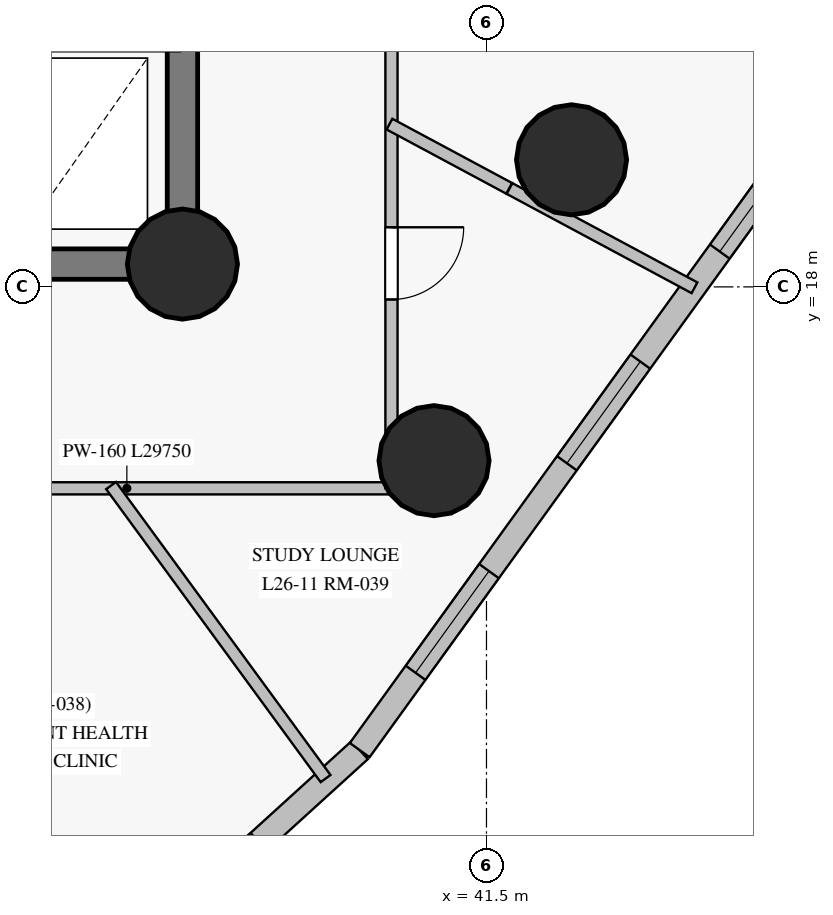
"""IFC4 building model, lengths in metres.
Left out: names, types, materials, properties, quantities, classifications, styles, units other than length and angle.
Written with IfcOpenShell. Run it as: python <this file> out.ifc"""

import sys

from ifc_helpers import new_model, si_unit, direction, frame, frame_2d, origin, origin_with_axes, origin_2d, place, context, subcontext, project, spatial, rectangle, circle, extrude, source, transform, mapped, element, fill, save


model = new_model("IFC4")
c1 = context("Model", 3, precision=1e-05, world=origin(), true_north=direction((0.0, 1.0)))
c2 = subcontext(c1, "Body", "Model", "MODEL_VIEW")
j1 = project(units=[si_unit("LENGTHUNIT", "METRE"), si_unit("PLANEANGLEUNIT", "RADIAN")], contexts=[c1])
p1 = place(None, origin())
s1 = spatial("IfcSite", under=j1, at=p1, CompositionType="ELEMENT")
p2 = place(p1, origin())
s2 = spatial("IfcBuilding", under=s1, at=p2, CompositionType="ELEMENT")
p3 = place(p2, frame((0.0, 0.0, 99.25)))
s3 = spatial("IfcBuildingStorey", under=s2, at=p3, CompositionType="ELEMENT", Elevation=99.25)
p4 = place(p3, frame((26.55, 18.3, 0.0), z_axis=(0.0, 0.0, 1.0), x_axis=(1.0, 0.0, 0.0)))
e1 = element("IfcWall", 1, at=p4, inside=s3, PredefinedType="SHEAR", context=c2, shape_type="SweptSolid", body=[
    extrude(rectangle(XDim=10.95, YDim=0.4, at=frame_2d((5.475, 0.0))), origin(), (0.0, 0.0, 1.0), 2.825),
])
p5 = place(p4, frame((4.55, 0.0, 0.0)))
e2 = element("IfcOpeningElement", 2, at=p5, cuts=e1, PredefinedType="OPENING", context=c2, shape_type="SweptSolid", body=[
    extrude(rectangle(XDim=1.4, YDim=2.2, at=frame_2d((0.7, 1.1))), frame((0.0, 0.21, 0.0), z_axis=(0.0, -1.0, 0.0), x_axis=(1.0, 0.0, 0.0)), (0.0, 0.0, 1.0), 0.42),
])
p6 = place(p3, frame((37.5, 18.3, 0.0), z_axis=(0.0, 0.0, 1.0), x_axis=(0.0, 1.0, 0.0)))
e3 = element("IfcWall", 3, at=p6, inside=s3, PredefinedType="SHEAR", context=c2, shape_type="SweptSolid", body=[
    extrude(rectangle(XDim=16.4, YDim=0.4, at=frame_2d((8.2, 0.0))), origin(), (0.0, 0.0, 1.0), 2.825),
])
p7 = place(p6, frame((14.15, 0.0, 0.0)))
e4 = element("IfcOpeningElement", 4, at=p7, cuts=e3, PredefinedType="OPENING", context=c2, shape_type="SweptSolid", body=[
    extrude(rectangle(XDim=1.2, YDim=2.15, at=frame_2d((0.6, 1.075))), frame((0.0, 0.21, 0.0), z_axis=(0.0, -1.0, 0.0), x_axis=(1.0, 0.0, 0.0)), (0.0, 0.0, 1.0), 0.42),
])
m1 = source(origin_with_axes(), c2, "Body", "SweptSolid", [
    extrude(circle(Radius=0.725, at=origin_2d()), origin(), (0.0, 0.0, 1.0), 3.05),
])
for number, where, z_axis, x_axis in (
    (5, (37.5, 18.3, 0.0), (0.0, 0.0, 1.0), (1.0, 0.0, 0.0)),
    (6, (42.619, 19.672, 0.0), (0.0, 0.0, 1.0), (1.0, 0.0, 0.0)),
    (7, (40.81, 15.714, 0.0), (0.0, 0.0, 1.0), (1.0, 0.0, 0.0)),
):
    element("IfcColumn", number, at=place(p3, frame(where, z_axis=z_axis, x_axis=x_axis)), inside=s3, PredefinedType="COLUMN", context=c2, shape_type="MappedRepresentation", body=[
        mapped(m1, transform((0.0, 0.0, 0.0), scale=1.0)),
    ])
p8 = place(p3, frame((28.773, 1.85, 0.0), z_axis=(0.0, 0.0, 1.0), x_axis=(0.739889815612, 0.672728073409, 0.0)))
e8 = element("IfcWall", 8, at=p8, inside=s3, PredefinedType="SOLIDWALL", context=c2, shape_type="SweptSolid", body=[
    extrude(rectangle(XDim=14.948, YDim=0.32, at=frame_2d((7.474, 0.0))), origin(), (0.0, 0.0, 1.0), 2.825),
])
p9 = place(p8, frame((2.629, 0.0, 0.85)))
e9 = element("IfcOpeningElement", 9, at=p9, cuts=e8, PredefinedType="OPENING", context=c2, shape_type="SweptSolid", body=[
    extrude(rectangle(XDim=1.65, YDim=1.65, at=frame_2d((0.825, 0.825))), frame((0.0, 0.17, 0.0), z_axis=(0.0, -1.0, 0.0), x_axis=(1.0, 0.0, 0.0)), (0.0, 0.0, 1.0), 0.34),
])
p10 = place(p8, frame((8.063, 0.0, 0.85)))
e10 = element("IfcOpeningElement", 10, at=p10, cuts=e8, PredefinedType="OPENING", context=c2, shape_type="SweptSolid", body=[
    extrude(rectangle(XDim=1.65, YDim=1.65, at=frame_2d((0.825, 0.825))), frame((0.0, 0.17, 0.0), z_axis=(0.0, -1.0, 0.0), x_axis=(1.0, 0.0, 0.0)), (0.0, 0.0, 1.0), 0.34),
])
p11 = place(p8, frame((11.502, 0.0, 0.85)))
e11 = element("IfcOpeningElement", 11, at=p11, cuts=e8, PredefinedType="OPENING", context=c2, shape_type="SweptSolid", body=[
    extrude(rectangle(XDim=1.65, YDim=1.65, at=frame_2d((0.825, 0.825))), frame((0.0, 0.17, 0.0), z_axis=(0.0, -1.0, 0.0), x_axis=(1.0, 0.0, 0.0)), (0.0, 0.0, 1.0), 0.34),
])
p12 = place(p3, frame((39.832, 11.906, 0.0), z_axis=(0.0, 0.0, 1.0), x_axis=(0.585524008993, 0.810655065298, 0.0)))
e12 = element("IfcWall", 12, at=p12, inside=s3, PredefinedType="SOLIDWALL", context=c2, shape_type="SweptSolid", body=[
    extrude(rectangle(XDim=10.391, YDim=0.32, at=frame_2d((5.196, 0.0))), origin(), (0.0, 0.0, 1.0), 2.825),
])
p13 = place(p12, frame((1.255, 0.0, 0.85)))
e13 = element("IfcOpeningElement", 13, at=p13, cuts=e12, PredefinedType="OPENING", context=c2, shape_type="SweptSolid", body=[
    extrude(rectangle(XDim=1.65, YDim=1.65, at=frame_2d((0.825, 0.825))), frame((0.0, 0.17, 0.0), z_axis=(0.0, -1.0, 0.0), x_axis=(1.0, 0.0, 0.0)), (0.0, 0.0, 1.0), 0.34),
])
p14 = place(p12, frame((4.656, 0.0, 0.85)))
e14 = element("IfcOpeningElement", 14, at=p14, cuts=e12, PredefinedType="OPENING", context=c2, shape_type="SweptSolid", body=[
    extrude(rectangle(XDim=1.65, YDim=1.65, at=frame_2d((0.825, 0.825))), frame((0.0, 0.17, 0.0), z_axis=(0.0, -1.0, 0.0), x_axis=(1.0, 0.0, 0.0)), (0.0, 0.0, 1.0), 0.34),
])
p15 = place(p12, frame((8.091, 0.0, 0.85)))
e15 = element("IfcOpeningElement", 15, at=p15, cuts=e12, PredefinedType="OPENING", context=c2, shape_type="SweptSolid", body=[
    extrude(rectangle(XDim=1.65, YDim=1.65, at=frame_2d((0.825, 0.825))), frame((0.0, 0.17, 0.0), z_axis=(0.0, -1.0, 0.0), x_axis=(1.0, 0.0, 0.0)), (0.0, 0.0, 1.0), 0.34),
])
p16 = place(p3, frame((40.25, 15.35, 0.0), z_axis=(0.0, 0.0, 1.0), x_axis=(-1.0, 0.0, 0.0)))
e16 = element("IfcWall", 16, at=p16, inside=s3, PredefinedType="PARTITIONING", context=c2, shape_type="SweptSolid", body=[
    extrude(rectangle(XDim=29.75, YDim=0.16, at=frame_2d((14.875, 0.0))), origin(), (0.0, 0.0, 1.0), 2.225),
])
p17 = place(p16, frame((24.369, 0.0, 0.0)))
e17 = element("IfcOpeningElement", 17, at=p17, cuts=e16, PredefinedType="OPENING", context=c2, shape_type="SweptSolid", body=[
    extrude(rectangle(XDim=0.95, YDim=2.15, at=frame_2d((0.475, 1.075))), frame((0.0, 0.09, 0.0), z_axis=(0.0, -1.0, 0.0), x_axis=(1.0, 0.0, 0.0)), (0.0, 0.0, 1.0), 0.18),
])
p18 = place(p16, frame((21.498, 0.0, 0.0)))
e18 = element("IfcOpeningElement", 18, at=p18, cuts=e16, PredefinedType="OPENING", context=c2, shape_type="SweptSolid", body=[
    extrude(rectangle(XDim=0.95, YDim=2.15, at=frame_2d((0.475, 1.075))), frame((0.0, 0.09, 0.0), z_axis=(0.0, -1.0, 0.0), x_axis=(1.0, 0.0, 0.0)), (0.0, 0.0, 1.0), 0.18),
])
p19 = place(p16, frame((18.373, 0.0, 0.0)))
e19 = element("IfcOpeningElement", 19, at=p19, cuts=e16, PredefinedType="OPENING", context=c2, shape_type="SweptSolid", body=[
    extrude(rectangle(XDim=0.95, YDim=2.15, at=frame_2d((0.475, 1.075))), frame((0.0, 0.09, 0.0), z_axis=(0.0, -1.0, 0.0), x_axis=(1.0, 0.0, 0.0)), (0.0, 0.0, 1.0), 0.18),
])
p20 = place(p16, frame((16.347, 0.0, 0.0)))
e20 = element("IfcOpeningElement", 20, at=p20, cuts=e16, PredefinedType="OPENING", context=c2, shape_type="SweptSolid", body=[
    extrude(rectangle(XDim=0.95, YDim=2.15, at=frame_2d((0.475, 1.075))), frame((0.0, 0.09, 0.0), z_axis=(0.0, -1.0, 0.0), x_axis=(1.0, 0.0, 0.0)), (0.0, 0.0, 1.0), 0.18),
])
p21 = place(p16, frame((14.4, 0.0, 0.0)))
e21 = element("IfcOpeningElement", 21, at=p21, cuts=e16, PredefinedType="OPENING", context=c2, shape_type="SweptSolid", body=[
    extrude(rectangle(XDim=0.95, YDim=2.15, at=frame_2d((0.475, 1.075))), frame((0.0, 0.09, 0.0), z_axis=(0.0, -1.0, 0.0), x_axis=(1.0, 0.0, 0.0)), (0.0, 0.0, 1.0), 0.18),
])
p22 = place(p16, frame((12.386, 0.0, 0.0)))
e22 = element("IfcOpeningElement", 22, at=p22, cuts=e16, PredefinedType="OPENING", context=c2, shape_type="SweptSolid", body=[
    extrude(rectangle(XDim=0.95, YDim=2.15, at=frame_2d((0.475, 1.075))), frame((0.0, 0.09, 0.0), z_axis=(0.0, -1.0, 0.0), x_axis=(1.0, 0.0, 0.0)), (0.0, 0.0, 1.0), 0.18),
])
p23 = place(p16, frame((9.938, 0.0, 0.0)))
e23 = element("IfcOpeningElement", 23, at=p23, cuts=e16, PredefinedType="OPENING", context=c2, shape_type="SweptSolid", body=[
    extrude(rectangle(XDim=0.95, YDim=2.15, at=frame_2d((0.475, 1.075))), frame((0.0, 0.09, 0.0), z_axis=(0.0, -1.0, 0.0), x_axis=(1.0, 0.0, 0.0)), (0.0, 0.0, 1.0), 0.18),
])
p24 = place(p16, frame((6.962, 0.0, 0.0)))
e24 = element("IfcOpeningElement", 24, at=p24, cuts=e16, PredefinedType="OPENING", context=c2, shape_type="SweptSolid", body=[
    extrude(rectangle(XDim=0.95, YDim=2.15, at=frame_2d((0.475, 1.075))), frame((0.0, 0.09, 0.0), z_axis=(0.0, -1.0, 0.0), x_axis=(1.0, 0.0, 0.0)), (0.0, 0.0, 1.0), 0.18),
])
p25 = place(p3, frame((40.25, 37.65, 0.0), z_axis=(0.0, 0.0, 1.0), x_axis=(0.0, -1.0, 0.0)))
e25 = element("IfcWall", 25, at=p25, inside=s3, PredefinedType="PARTITIONING", context=c2, shape_type="SweptSolid", body=[
    extrude(rectangle(XDim=22.3, YDim=0.16, at=frame_2d((11.15, 0.0))), origin(), (0.0, 0.0, 1.0), 2.225),
])
p26 = place(p25, frame((18.866, 0.0, 0.0)))
e26 = element("IfcOpeningElement", 26, at=p26, cuts=e25, PredefinedType="OPENING", context=c2, shape_type="SweptSolid", body=[
    extrude(rectangle(XDim=0.95, YDim=2.15, at=frame_2d((0.475, 1.075))), frame((0.0, 0.09, 0.0), z_axis=(0.0, -1.0, 0.0), x_axis=(1.0, 0.0, 0.0)), (0.0, 0.0, 1.0), 0.18),
])
p27 = place(p25, frame((11.015, 0.0, 0.0)))
e27 = element("IfcOpeningElement", 27, at=p27, cuts=e25, PredefinedType="OPENING", context=c2, shape_type="SweptSolid", body=[
    extrude(rectangle(XDim=0.95, YDim=2.15, at=frame_2d((0.475, 1.075))), frame((0.0, 0.09, 0.0), z_axis=(0.0, -1.0, 0.0), x_axis=(1.0, 0.0, 0.0)), (0.0, 0.0, 1.0), 0.18),
])
p28 = place(p25, frame((8.866, 0.0, 0.0)))
e28 = element("IfcOpeningElement", 28, at=p28, cuts=e25, PredefinedType="OPENING", context=c2, shape_type="SweptSolid", body=[
    extrude(rectangle(XDim=0.95, YDim=2.15, at=frame_2d((0.475, 1.075))), frame((0.0, 0.09, 0.0), z_axis=(0.0, -1.0, 0.0), x_axis=(1.0, 0.0, 0.0)), (0.0, 0.0, 1.0), 0.18),
])
p29 = place(p25, frame((6.84, 0.0, 0.0)))
e29 = element("IfcOpeningElement", 29, at=p29, cuts=e25, PredefinedType="OPENING", context=c2, shape_type="SweptSolid", body=[
    extrude(rectangle(XDim=0.95, YDim=2.15, at=frame_2d((0.475, 1.075))), frame((0.0, 0.09, 0.0), z_axis=(0.0, -1.0, 0.0), x_axis=(1.0, 0.0, 0.0)), (0.0, 0.0, 1.0), 0.18),
])
p30 = place(p25, frame((4.56, 0.0, 0.0)))
e30 = element("IfcOpeningElement", 30, at=p30, cuts=e25, PredefinedType="OPENING", context=c2, shape_type="SweptSolid", body=[
    extrude(rectangle(XDim=0.95, YDim=2.15, at=frame_2d((0.475, 1.075))), frame((0.0, 0.09, 0.0), z_axis=(0.0, -1.0, 0.0), x_axis=(1.0, 0.0, 0.0)), (0.0, 0.0, 1.0), 0.18),
])
p31 = place(p25, frame((0.915, 0.0, 0.0)))
e31 = element("IfcOpeningElement", 31, at=p31, cuts=e25, PredefinedType="OPENING", context=c2, shape_type="SweptSolid", body=[
    extrude(rectangle(XDim=0.95, YDim=2.15, at=frame_2d((0.475, 1.075))), frame((0.0, 0.09, 0.0), z_axis=(0.0, -1.0, 0.0), x_axis=(1.0, 0.0, 0.0)), (0.0, 0.0, 1.0), 0.18),
])
p32 = place(p3, frame((36.561, 15.386, 0.0), z_axis=(0.0, 0.0, 1.0), x_axis=(0.590678841896, -0.806906751574, 0.0)))
e32 = element("IfcWall", 32, at=p32, inside=s3, PredefinedType="PARTITIONING", context=c2, shape_type="SweptSolid", body=[
    extrude(rectangle(XDim=4.777, YDim=0.16, at=frame_2d((2.389, 0.0))), origin(), (0.0, 0.0, 1.0), 2.825),
])
p33 = place(p3, frame((40.224, 20.142, 0.0), z_axis=(0.0, 0.0, 1.0), x_axis=(0.881136678739, -0.472861664106, 0.0)))
e33 = element("IfcWall", 33, at=p33, inside=s3, PredefinedType="PARTITIONING", context=c2, shape_type="SweptSolid", body=[
    extrude(rectangle(XDim=1.788, YDim=0.16, at=frame_2d((0.894, 0.0))), origin(), (0.0, 0.0, 1.0), 2.225),
])
p34 = place(p3, frame((41.803, 19.294, 0.0), z_axis=(0.0, 0.0, 1.0), x_axis=(0.881165658259, -0.472807659313, 0.0)))
e34 = element("IfcWall", 34, at=p34, inside=s3, PredefinedType="PARTITIONING", context=c2, shape_type="SweptSolid", body=[
    extrude(rectangle(XDim=2.761, YDim=0.16, at=frame_2d((1.381, 0.0))), origin(), (0.0, 0.0, 1.0), 2.225),
])
m2 = source(origin_with_axes(), c2, "Body", "SweptSolid", [
    extrude(rectangle(XDim=1.65, YDim=1.65, at=frame_2d((0.825, 0.825))), frame((0.0, 0.03, 0.0), z_axis=(0.0, -1.0, 0.0), x_axis=(1.0, 0.0, 0.0)), (0.0, 0.0, 1.0), 0.06),
])
p35 = place(p13, origin())
e35 = element("IfcWindow", 35, at=p35, inside=s3, PartitioningType="SINGLE_PANEL", PredefinedType="WINDOW", context=c2, shape_type="MappedRepresentation", body=[
    mapped(m2, transform((0.0, 0.0, 0.0), scale=1.0)),
])
fill(e13, e35)
p36 = place(p14, origin())
e36 = element("IfcWindow", 36, at=p36, inside=s3, PartitioningType="SINGLE_PANEL", PredefinedType="WINDOW", context=c2, shape_type="MappedRepresentation", body=[
    mapped(m2, transform((0.0, 0.0, 0.0), scale=1.0)),
])
fill(e14, e36)
p37 = place(p15, origin())
e37 = element("IfcWindow", 37, at=p37, inside=s3, PartitioningType="SINGLE_PANEL", PredefinedType="WINDOW", context=c2, shape_type="MappedRepresentation", body=[
    mapped(m2, transform((0.0, 0.0, 0.0), scale=1.0)),
])
fill(e15, e37)
m3 = source(origin_with_axes(), c2, "Body", "SweptSolid", [
    extrude(rectangle(XDim=0.95, YDim=2.15, at=frame_2d((0.475, 1.075))), frame((0.0, 0.025, 0.0), z_axis=(0.0, -1.0, 0.0), x_axis=(1.0, 0.0, 0.0)), (0.0, 0.0, 1.0), 0.05),
])
p38 = place(p26, origin())
e38 = element("IfcDoor", 38, at=p38, inside=s3, OperationType="SINGLE_SWING_LEFT", PredefinedType="DOOR", context=c2, shape_type="MappedRepresentation", body=[
    mapped(m3, transform((0.0, 0.0, 0.0), scale=1.0)),
])
fill(e26, e38)
save(model, sys.argv[1])
